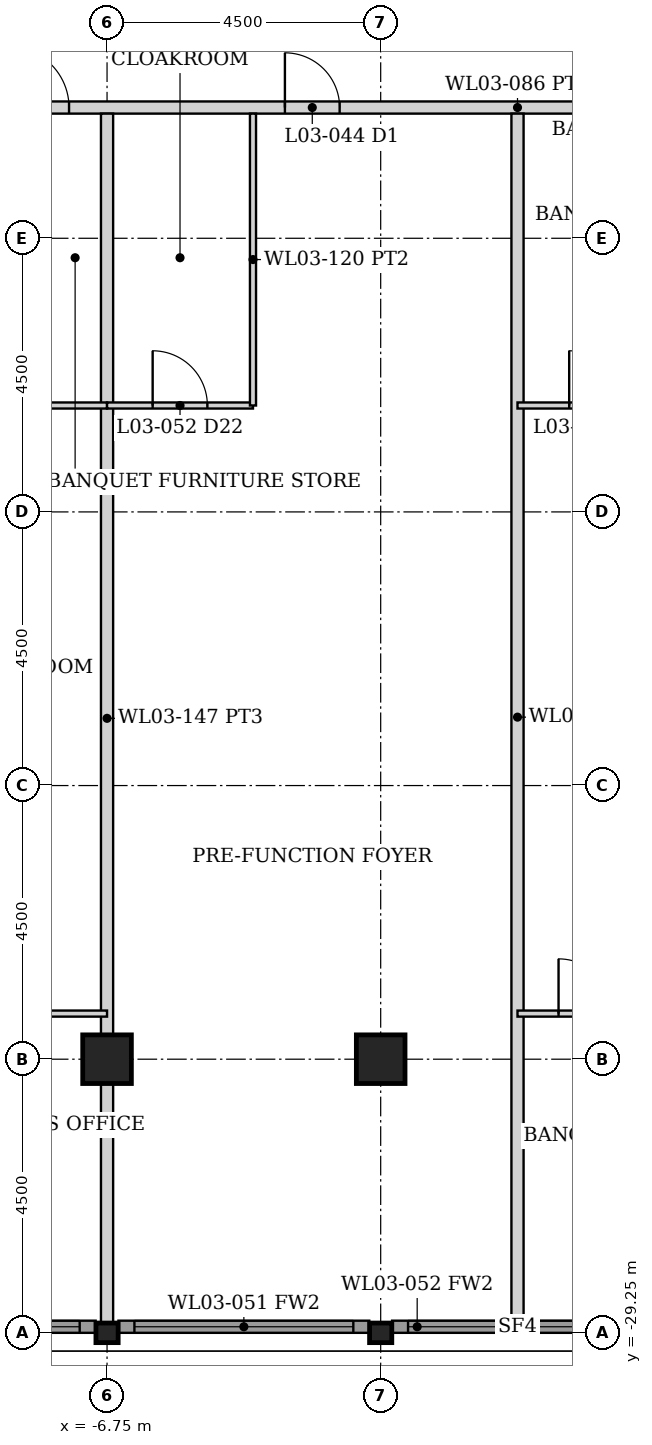
"""IFC4 building model, lengths in metres.
Left out: names, types, materials, properties, quantities, classifications, styles, units other than length and angle.
Written with IfcOpenShell. Run it as: python <this file> out.ifc"""

import sys

from ifc_helpers import new_model, si_unit, direction, frame, frame_2d, origin, origin_2d, place, context, subcontext, project, spatial, rectangle, hollow_rectangle, i_section, extrude, element, fill, save


model = new_model("IFC4")
c1 = context("Model", 3, precision=1e-05, world=origin(), true_north=direction((0.0, 1.0)))
c2 = subcontext(c1, "Body", "Model", "MODEL_VIEW")
j1 = project(units=[si_unit("LENGTHUNIT", "METRE"), si_unit("PLANEANGLEUNIT", "RADIAN")], contexts=[c1])
p1 = place(None, origin())
s1 = spatial("IfcSite", under=j1, at=p1, CompositionType="ELEMENT")
p2 = place(p1, origin())
s2 = spatial("IfcBuilding", under=s1, at=p2, CompositionType="ELEMENT")
p3 = place(p2, frame((0.0, 0.0, 16.0)))
s3 = spatial("IfcBuildingStorey", under=s2, at=p3, CompositionType="ELEMENT", Elevation=16.0)
for number, where, z_axis, x_axis in (
    (1, (-6.75, -24.75, 0.0), (0.0, 0.0, 1.0), (0.0, 1.0, 0.0)),
    (2, (-2.25, -24.75, 0.0), (0.0, 0.0, 1.0), (0.0, 1.0, 0.0)),
):
    element("IfcColumn", number, at=place(p3, frame(where, z_axis=z_axis, x_axis=x_axis)), inside=s3, PredefinedType="COLUMN", context=c2, shape_type="SweptSolid", body=[
        extrude(hollow_rectangle(XDim=0.8, YDim=0.8, WallThickness=0.08, at=origin_2d()), origin(), (0.0, 0.0, 1.0), 5.5),
    ])
for number, where, z_axis, x_axis in (
    (3, (-6.75, -29.25, 0.0), (0.0, 0.0, 1.0), (0.0, 1.0, 0.0)),
    (4, (-2.25, -29.25, 0.0), (0.0, 0.0, 1.0), (0.0, 1.0, 0.0)),
):
    element("IfcColumn", number, at=place(p3, frame(where, z_axis=z_axis, x_axis=x_axis)), inside=s3, PredefinedType="COLUMN", context=c2, shape_type="SweptSolid", body=[
        extrude(i_section(OverallWidth=0.322, OverallDepth=0.365, WebThickness=0.027, FlangeThickness=0.044, FilletRadius=0.015, at=origin_2d()), origin(), (0.0, 0.0, 1.0), 5.5),
    ])
p4 = place(p3, frame((-11.062, -29.15, 0.0), z_axis=(0.0, 0.0, 1.0), x_axis=(1.0, 0.0, 0.0)))
e5 = element("IfcWall", 5, at=p4, inside=s3, PredefinedType="SOLIDWALL", context=c2, shape_type="SweptSolid", body=[
    extrude(rectangle(XDim=4.125, YDim=0.2, at=frame_2d((2.062, 0.0))), origin(), (0.0, 0.0, 1.0), 4.633),
])
p5 = place(p4, frame((0.262, 0.0, 0.15)))
e6 = element("IfcOpeningElement", 6, at=p5, cuts=e5, PredefinedType="OPENING", context=c2, shape_type="SweptSolid", body=[
    extrude(rectangle(XDim=3.6, YDim=4.333, at=frame_2d((1.8, 2.167))), frame((0.0, 0.11, 0.0), z_axis=(0.0, -1.0, 0.0), x_axis=(1.0, 0.0, 0.0)), (0.0, 0.0, 1.0), 0.22),
])
p6 = place(p3, frame((-6.562, -29.15, 0.0), z_axis=(0.0, 0.0, 1.0), x_axis=(1.0, 0.0, 0.0)))
e7 = element("IfcWall", 7, at=p6, inside=s3, PredefinedType="SOLIDWALL", context=c2, shape_type="SweptSolid", body=[
    extrude(rectangle(XDim=4.125, YDim=0.2, at=frame_2d((2.062, 0.0))), origin(), (0.0, 0.0, 1.0), 4.633),
])
p7 = place(p6, frame((0.262, 0.0, 0.15)))
e8 = element("IfcOpeningElement", 8, at=p7, cuts=e7, PredefinedType="OPENING", context=c2, shape_type="SweptSolid", body=[
    extrude(rectangle(XDim=3.6, YDim=4.333, at=frame_2d((1.8, 2.167))), frame((0.0, 0.11, 0.0), z_axis=(0.0, -1.0, 0.0), x_axis=(1.0, 0.0, 0.0)), (0.0, 0.0, 1.0), 0.22),
])
p8 = place(p3, frame((-2.062, -29.15, 0.0), z_axis=(0.0, 0.0, 1.0), x_axis=(1.0, 0.0, 0.0)))
e9 = element("IfcWall", 9, at=p8, inside=s3, PredefinedType="SOLIDWALL", context=c2, shape_type="SweptSolid", body=[
    extrude(rectangle(XDim=4.125, YDim=0.2, at=frame_2d((2.062, 0.0))), origin(), (0.0, 0.0, 1.0), 4.633),
])
p9 = place(p8, frame((0.262, 0.0, 0.15)))
e10 = element("IfcOpeningElement", 10, at=p9, cuts=e9, PredefinedType="OPENING", context=c2, shape_type="SweptSolid", body=[
    extrude(rectangle(XDim=3.6, YDim=4.333, at=frame_2d((1.8, 2.167))), frame((0.0, 0.11, 0.0), z_axis=(0.0, -1.0, 0.0), x_axis=(1.0, 0.0, 0.0)), (0.0, 0.0, 1.0), 0.22),
])
p10 = place(p3, frame((-25.075, -9.1, 0.0), z_axis=(0.0, 0.0, 1.0), x_axis=(1.0, 0.0, 0.0)))
e11 = element("IfcWall", 11, at=p10, inside=s3, PredefinedType="PARTITIONING", context=c2, shape_type="SweptSolid", body=[
    extrude(rectangle(XDim=50.15, YDim=0.2, at=frame_2d((25.075, 0.0))), origin(), (0.0, 0.0, 1.0), 4.329),
])
p11 = place(p10, frame((2.125, 0.0, 0.0)))
e12 = element("IfcOpeningElement", 12, at=p11, cuts=e11, PredefinedType="OPENING", context=c2, shape_type="SweptSolid", body=[
    extrude(rectangle(XDim=0.9, YDim=2.1, at=frame_2d((0.45, 1.05))), frame((0.0, 0.11, 0.0), z_axis=(0.0, -1.0, 0.0), x_axis=(1.0, 0.0, 0.0)), (0.0, 0.0, 1.0), 0.22),
])
p12 = place(p10, frame((10.225, 0.0, 0.0)))
e13 = element("IfcOpeningElement", 13, at=p12, cuts=e11, PredefinedType="OPENING", context=c2, shape_type="SweptSolid", body=[
    extrude(rectangle(XDim=0.9, YDim=2.1, at=frame_2d((0.45, 1.05))), frame((0.0, 0.11, 0.0), z_axis=(0.0, -1.0, 0.0), x_axis=(1.0, 0.0, 0.0)), (0.0, 0.0, 1.0), 0.22),
])
p13 = place(p10, frame((16.7, 0.0, 0.0)))
e14 = element("IfcOpeningElement", 14, at=p13, cuts=e11, PredefinedType="OPENING", context=c2, shape_type="SweptSolid", body=[
    extrude(rectangle(XDim=1.0, YDim=2.1, at=frame_2d((0.5, 1.05))), frame((0.0, 0.11, 0.0), z_axis=(0.0, -1.0, 0.0), x_axis=(1.0, 0.0, 0.0)), (0.0, 0.0, 1.0), 0.22),
])
p14 = place(p10, frame((14.525, 0.0, 0.0)))
e15 = element("IfcOpeningElement", 15, at=p14, cuts=e11, PredefinedType="OPENING", context=c2, shape_type="SweptSolid", body=[
    extrude(rectangle(XDim=0.9, YDim=2.1, at=frame_2d((0.45, 1.05))), frame((0.0, 0.11, 0.0), z_axis=(0.0, -1.0, 0.0), x_axis=(1.0, 0.0, 0.0)), (0.0, 0.0, 1.0), 0.22),
])
p15 = place(p10, frame((21.25, 0.0, 0.0)))
e16 = element("IfcOpeningElement", 16, at=p15, cuts=e11, PredefinedType="OPENING", context=c2, shape_type="SweptSolid", body=[
    extrude(rectangle(XDim=0.9, YDim=2.1, at=frame_2d((0.45, 1.05))), frame((0.0, 0.11, 0.0), z_axis=(0.0, -1.0, 0.0), x_axis=(1.0, 0.0, 0.0)), (0.0, 0.0, 1.0), 0.22),
])
p16 = place(p10, frame((33.325, 0.0, 0.0)))
e17 = element("IfcOpeningElement", 17, at=p16, cuts=e11, PredefinedType="OPENING", context=c2, shape_type="SweptSolid", body=[
    extrude(rectangle(XDim=1.5, YDim=2.1, at=frame_2d((0.75, 1.05))), frame((0.0, 0.11, 0.0), z_axis=(0.0, -1.0, 0.0), x_axis=(1.0, 0.0, 0.0)), (0.0, 0.0, 1.0), 0.22),
])
p17 = place(p10, frame((36.95, 0.0, 0.0)))
e18 = element("IfcOpeningElement", 18, at=p17, cuts=e11, PredefinedType="OPENING", context=c2, shape_type="SweptSolid", body=[
    extrude(rectangle(XDim=1.0, YDim=2.1, at=frame_2d((0.5, 1.05))), frame((0.0, 0.11, 0.0), z_axis=(0.0, -1.0, 0.0), x_axis=(1.0, 0.0, 0.0)), (0.0, 0.0, 1.0), 0.22),
])
p18 = place(p10, frame((44.825, 0.0, 0.0)))
e19 = element("IfcOpeningElement", 19, at=p18, cuts=e11, PredefinedType="OPENING", context=c2, shape_type="SweptSolid", body=[
    extrude(rectangle(XDim=1.0, YDim=2.1, at=frame_2d((0.5, 1.05))), frame((0.0, 0.11, 0.0), z_axis=(0.0, -1.0, 0.0), x_axis=(1.0, 0.0, 0.0)), (0.0, 0.0, 1.0), 0.22),
])
p19 = place(p10, frame((39.225, 0.0, 0.0)))
e20 = element("IfcOpeningElement", 20, at=p19, cuts=e11, PredefinedType="OPENING", context=c2, shape_type="SweptSolid", body=[
    extrude(rectangle(XDim=0.9, YDim=2.1, at=frame_2d((0.45, 1.05))), frame((0.0, 0.11, 0.0), z_axis=(0.0, -1.0, 0.0), x_axis=(1.0, 0.0, 0.0)), (0.0, 0.0, 1.0), 0.22),
])
p20 = place(p3, frame((-6.75, -29.089, 0.0), z_axis=(0.0, 0.0, 1.0), x_axis=(0.0, 1.0, 0.0)))
e21 = element("IfcWall", 21, at=p20, inside=s3, PredefinedType="PARTITIONING", context=c2, shape_type="SweptSolid", body=[
    extrude(rectangle(XDim=19.889, YDim=0.2, at=frame_2d((9.944, 0.0))), origin(), (0.0, 0.0, 1.0), 4.329),
])
p21 = place(p3, frame((0.0, -29.05, 0.0), z_axis=(0.0, 0.0, 1.0), x_axis=(0.0, 1.0, 0.0)))
e22 = element("IfcWall", 22, at=p21, inside=s3, PredefinedType="PARTITIONING", context=c2, shape_type="SweptSolid", body=[
    extrude(rectangle(XDim=19.85, YDim=0.2, at=frame_2d((9.925, 0.0))), origin(), (0.0, 0.0, 1.0), 4.329),
])
p22 = place(p3, frame((-9.0, -14.0, 0.0), z_axis=(0.0, 0.0, 1.0), x_axis=(1.0, 0.0, 0.0)))
e23 = element("IfcWall", 23, at=p22, inside=s3, PredefinedType="PARTITIONING", context=c2, shape_type="SweptSolid", body=[
    extrude(rectangle(XDim=2.25, YDim=0.1, at=frame_2d((1.125, 0.0))), origin(), (0.0, 0.0, 1.0), 4.329),
])
p23 = place(p3, frame((-11.25, -24.0, 0.0), z_axis=(0.0, 0.0, 1.0), x_axis=(1.0, 0.0, 0.0)))
e24 = element("IfcWall", 24, at=p23, inside=s3, PredefinedType="PARTITIONING", context=c2, shape_type="SweptSolid", body=[
    extrude(rectangle(XDim=4.5, YDim=0.1, at=frame_2d((2.25, 0.0))), origin(), (0.0, 0.0, 1.0), 4.329),
])
p24 = place(p23, frame((1.8, 0.0, 0.0)))
e25 = element("IfcOpeningElement", 25, at=p24, cuts=e24, PredefinedType="OPENING", context=c2, shape_type="SweptSolid", body=[
    extrude(rectangle(XDim=0.9, YDim=2.1, at=frame_2d((0.45, 1.05))), frame((0.0, 0.06, 0.0), z_axis=(0.0, -1.0, 0.0), x_axis=(1.0, 0.0, 0.0)), (0.0, 0.0, 1.0), 0.12),
])
p25 = place(p3, frame((-6.75, -14.0, 0.0), z_axis=(0.0, 0.0, 1.0), x_axis=(1.0, 0.0, 0.0)))
e26 = element("IfcWall", 26, at=p25, inside=s3, PredefinedType="PARTITIONING", context=c2, shape_type="SweptSolid", body=[
    extrude(rectangle(XDim=2.4, YDim=0.1, at=frame_2d((1.2, 0.0))), origin(), (0.0, 0.0, 1.0), 4.329),
])
p26 = place(p25, frame((0.75, 0.0, 0.0)))
e27 = element("IfcOpeningElement", 27, at=p26, cuts=e26, PredefinedType="OPENING", context=c2, shape_type="SweptSolid", body=[
    extrude(rectangle(XDim=0.9, YDim=2.1, at=frame_2d((0.45, 1.05))), frame((0.0, 0.06, 0.0), z_axis=(0.0, -1.0, 0.0), x_axis=(1.0, 0.0, 0.0)), (0.0, 0.0, 1.0), 0.12),
])
p27 = place(p3, frame((-4.35, -14.0, 0.0), z_axis=(0.0, 0.0, 1.0), x_axis=(0.0, 1.0, 0.0)))
e28 = element("IfcWall", 28, at=p27, inside=s3, PredefinedType="PARTITIONING", context=c2, shape_type="SweptSolid", body=[
    extrude(rectangle(XDim=4.8, YDim=0.1, at=frame_2d((2.4, 0.0))), origin(), (0.0, 0.0, 1.0), 4.329),
])
p28 = place(p3, frame((0.0, -14.0, 0.0), z_axis=(0.0, 0.0, 1.0), x_axis=(1.0, 0.0, 0.0)))
e29 = element("IfcWall", 29, at=p28, inside=s3, PredefinedType="PARTITIONING", context=c2, shape_type="SweptSolid", body=[
    extrude(rectangle(XDim=7.4, YDim=0.1, at=frame_2d((3.7, 0.0))), origin(), (0.0, 0.0, 1.0), 4.329),
])
p29 = place(p28, frame((0.85, 0.0, 0.0)))
e30 = element("IfcOpeningElement", 30, at=p29, cuts=e29, PredefinedType="OPENING", context=c2, shape_type="SweptSolid", body=[
    extrude(rectangle(XDim=0.9, YDim=2.1, at=frame_2d((0.45, 1.05))), frame((0.0, 0.06, 0.0), z_axis=(0.0, -1.0, 0.0), x_axis=(1.0, 0.0, 0.0)), (0.0, 0.0, 1.0), 0.12),
])
p30 = place(p28, frame((3.3, 0.0, 0.0)))
e31 = element("IfcOpeningElement", 31, at=p30, cuts=e29, PredefinedType="OPENING", context=c2, shape_type="SweptSolid", body=[
    extrude(rectangle(XDim=1.0, YDim=2.1, at=frame_2d((0.5, 1.05))), frame((0.0, 0.06, 0.0), z_axis=(0.0, -1.0, 0.0), x_axis=(1.0, 0.0, 0.0)), (0.0, 0.0, 1.0), 0.12),
])
p31 = place(p28, frame((5.7, 0.0, 0.0)))
e32 = element("IfcOpeningElement", 32, at=p31, cuts=e29, PredefinedType="OPENING", context=c2, shape_type="SweptSolid", body=[
    extrude(rectangle(XDim=1.0, YDim=2.1, at=frame_2d((0.5, 1.05))), frame((0.0, 0.06, 0.0), z_axis=(0.0, -1.0, 0.0), x_axis=(1.0, 0.0, 0.0)), (0.0, 0.0, 1.0), 0.12),
])
p32 = place(p3, frame((0.0, -24.0, 0.0), z_axis=(0.0, 0.0, 1.0), x_axis=(1.0, 0.0, 0.0)))
e33 = element("IfcWall", 33, at=p32, inside=s3, PredefinedType="PARTITIONING", context=c2, shape_type="SweptSolid", body=[
    extrude(rectangle(XDim=2.25, YDim=0.1, at=frame_2d((1.125, 0.0))), origin(), (0.0, 0.0, 1.0), 4.329),
])
p33 = place(p32, frame((0.675, 0.0, 0.0)))
e34 = element("IfcOpeningElement", 34, at=p33, cuts=e33, PredefinedType="OPENING", context=c2, shape_type="SweptSolid", body=[
    extrude(rectangle(XDim=0.9, YDim=2.1, at=frame_2d((0.45, 1.05))), frame((0.0, 0.06, 0.0), z_axis=(0.0, -1.0, 0.0), x_axis=(1.0, 0.0, 0.0)), (0.0, 0.0, 1.0), 0.12),
])
p34 = place(p5, origin())
e35 = element("IfcWindow", 35, at=p34, inside=s3, PartitioningType="SINGLE_PANEL", PredefinedType="WINDOW", context=c2, shape_type="SweptSolid", body=[
    extrude(rectangle(XDim=3.6, YDim=4.333, at=frame_2d((1.8, 2.167))), frame((0.0, 0.03, 0.0), z_axis=(0.0, -1.0, 0.0), x_axis=(1.0, 0.0, 0.0)), (0.0, 0.0, 1.0), 0.06),
])
fill(e6, e35)
p35 = place(p7, origin())
e36 = element("IfcWindow", 36, at=p35, inside=s3, PartitioningType="SINGLE_PANEL", PredefinedType="WINDOW", context=c2, shape_type="SweptSolid", body=[
    extrude(rectangle(XDim=3.6, YDim=4.333, at=frame_2d((1.8, 2.167))), frame((0.0, 0.03, 0.0), z_axis=(0.0, -1.0, 0.0), x_axis=(1.0, 0.0, 0.0)), (0.0, 0.0, 1.0), 0.06),
])
fill(e8, e36)
p36 = place(p9, origin())
e37 = element("IfcWindow", 37, at=p36, inside=s3, PartitioningType="SINGLE_PANEL", PredefinedType="WINDOW", context=c2, shape_type="SweptSolid", body=[
    extrude(rectangle(XDim=3.6, YDim=4.333, at=frame_2d((1.8, 2.167))), frame((0.0, 0.03, 0.0), z_axis=(0.0, -1.0, 0.0), x_axis=(1.0, 0.0, 0.0)), (0.0, 0.0, 1.0), 0.06),
])
fill(e10, e37)
p37 = place(p13, origin())
e38 = element("IfcDoor", 38, at=p37, inside=s3, OperationType="SINGLE_SWING_LEFT", PredefinedType="DOOR", context=c2, shape_type="SweptSolid", body=[
    extrude(rectangle(XDim=1.0, YDim=2.1, at=frame_2d((0.5, 1.05))), frame((0.0, 0.025, 0.0), z_axis=(0.0, -1.0, 0.0), x_axis=(1.0, 0.0, 0.0)), (0.0, 0.0, 1.0), 0.05),
])
fill(e14, e38)
p38 = place(p26, origin())
e39 = element("IfcDoor", 39, at=p38, inside=s3, OperationType="SINGLE_SWING_LEFT", PredefinedType="DOOR", context=c2, shape_type="SweptSolid", body=[
    extrude(rectangle(XDim=0.9, YDim=2.1, at=frame_2d((0.45, 1.05))), frame((0.0, 0.025, 0.0), z_axis=(0.0, -1.0, 0.0), x_axis=(1.0, 0.0, 0.0)), (0.0, 0.0, 1.0), 0.05),
])
fill(e27, e39)
p39 = place(p15, origin())
e40 = element("IfcDoor", 40, at=p39, inside=s3, OperationType="SINGLE_SWING_LEFT", PredefinedType="DOOR", context=c2, shape_type="SweptSolid", body=[
    extrude(rectangle(XDim=0.9, YDim=2.1, at=frame_2d((0.45, 1.05))), frame((0.0, 0.025, 0.0), z_axis=(0.0, -1.0, 0.0), x_axis=(1.0, 0.0, 0.0)), (0.0, 0.0, 1.0), 0.05),
])
fill(e16, e40)
p40 = place(p29, origin())
e41 = element("IfcDoor", 41, at=p40, inside=s3, OperationType="SINGLE_SWING_LEFT", PredefinedType="DOOR", context=c2, shape_type="SweptSolid", body=[
    extrude(rectangle(XDim=0.9, YDim=2.1, at=frame_2d((0.45, 1.05))), frame((0.0, 0.025, 0.0), z_axis=(0.0, -1.0, 0.0), x_axis=(1.0, 0.0, 0.0)), (0.0, 0.0, 1.0), 0.05),
])
fill(e30, e41)
p41 = place(p33, origin())
e42 = element("IfcDoor", 42, at=p41, inside=s3, OperationType="SINGLE_SWING_LEFT", PredefinedType="DOOR", context=c2, shape_type="SweptSolid", body=[
    extrude(rectangle(XDim=0.9, YDim=2.1, at=frame_2d((0.45, 1.05))), frame((0.0, 0.025, 0.0), z_axis=(0.0, -1.0, 0.0), x_axis=(1.0, 0.0, 0.0)), (0.0, 0.0, 1.0), 0.05),
])
fill(e34, e42)
save(model, sys.argv[1])
